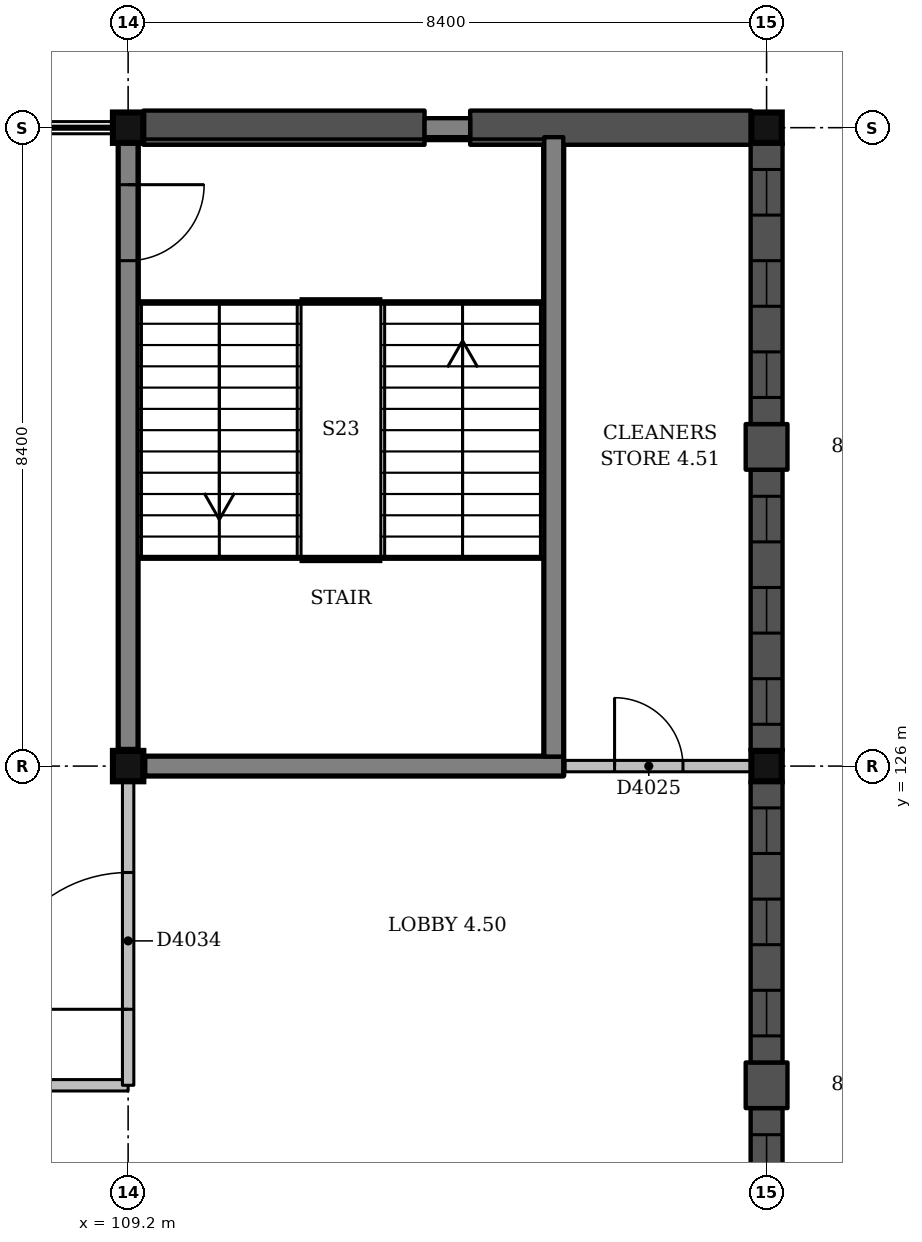
"""IFC4 building model, lengths in metres.
Left out: names, types, materials, properties, quantities, classifications, styles, units other than length and angle.
Written with IfcOpenShell. Run it as: python <this file> out.ifc"""

import sys

from ifc_helpers import new_model, si_unit, direction, frame, frame_2d, origin, origin_2d, place, context, subcontext, project, spatial, rectangle, extrude, element, fill, save


model = new_model("IFC4")
c1 = context("Model", 3, precision=1e-05, world=origin(), true_north=direction((0.0, 1.0)))
c2 = subcontext(c1, "Body", "Model", "MODEL_VIEW")
j1 = project(units=[si_unit("LENGTHUNIT", "METRE"), si_unit("PLANEANGLEUNIT", "RADIAN")], contexts=[c1])
p1 = place(None, origin())
s1 = spatial("IfcSite", under=j1, at=p1, CompositionType="ELEMENT")
p2 = place(p1, origin())
s2 = spatial("IfcBuilding", under=s1, at=p2, CompositionType="ELEMENT")
p3 = place(p2, frame((0.0, 0.0, 18.0)))
s3 = spatial("IfcBuildingStorey", under=s2, at=p3, CompositionType="ELEMENT", Elevation=18.0)
for number, where, z_axis, x_axis in (
    (1, (109.2, 126.0, 0.0), (0.0, 0.0, 1.0), (1.0, 0.0, 0.0)),
    (2, (109.2, 134.4, 0.0), (0.0, 0.0, 1.0), (1.0, 0.0, 0.0)),
    (3, (117.6, 126.0, 0.0), (0.0, 0.0, 1.0), (1.0, 0.0, 0.0)),
    (4, (117.6, 134.4, 0.0), (0.0, 0.0, 1.0), (1.0, 0.0, 0.0)),
):
    element("IfcColumn", number, at=place(p3, frame(where, z_axis=z_axis, x_axis=x_axis)), inside=s3, PredefinedType="COLUMN", context=c2, shape_type="SweptSolid", body=[
        extrude(rectangle(XDim=0.4, YDim=0.4, at=origin_2d()), origin(), (0.0, 0.0, 1.0), 4.5),
    ])
p4 = place(p3, frame((109.425, 126.0, 0.0), z_axis=(0.0, 0.0, 1.0), x_axis=(1.0, 0.0, 0.0)))
e5 = element("IfcWall", 5, at=p4, inside=s3, PredefinedType="SHEAR", context=c2, shape_type="SweptSolid", body=[
    extrude(rectangle(XDim=5.5, YDim=0.25, at=frame_2d((2.75, 0.0))), origin(), (0.0, 0.0, 1.0), 4.5),
])
p5 = place(p3, frame((109.2, 126.225, 0.0), z_axis=(0.0, 0.0, 1.0), x_axis=(0.0, 1.0, 0.0)))
e6 = element("IfcWall", 6, at=p5, inside=s3, PredefinedType="SHEAR", context=c2, shape_type="SweptSolid", body=[
    extrude(rectangle(XDim=7.975, YDim=0.25, at=frame_2d((3.987, 0.0))), origin(), (0.0, 0.0, 1.0), 4.5),
])
p6 = place(p5, frame((6.425, 0.0, 0.0)))
e7 = element("IfcOpeningElement", 7, at=p6, cuts=e6, PredefinedType="OPENING", context=c2, shape_type="SweptSolid", body=[
    extrude(rectangle(XDim=1.0, YDim=2.1, at=frame_2d((0.5, 1.05))), frame((0.0, 0.135, 0.0), z_axis=(0.0, -1.0, 0.0), x_axis=(1.0, 0.0, 0.0)), (0.0, 0.0, 1.0), 0.27),
])
p7 = place(p3, frame((114.8, 126.125, 0.0), z_axis=(0.0, 0.0, 1.0), x_axis=(0.0, 1.0, 0.0)))
e8 = element("IfcWall", 8, at=p7, inside=s3, PredefinedType="SHEAR", context=c2, shape_type="SweptSolid", body=[
    extrude(rectangle(XDim=8.15, YDim=0.25, at=frame_2d((4.075, 0.0))), origin(), (0.0, 0.0, 1.0), 4.5),
])
p8 = place(p3, frame((117.6, 117.8, 0.0), z_axis=(0.0, 0.0, 1.0), x_axis=(0.0, 1.0, 0.0)))
e9 = element("IfcWall", 9, at=p8, inside=s3, PredefinedType="SOLIDWALL", context=c2, shape_type="SweptSolid", body=[
    extrude(rectangle(XDim=3.7, YDim=0.42, at=frame_2d((1.85, 0.0))), origin(), (0.0, 0.0, 1.0), 3.45),
])
p9 = place(p8, frame((0.35, 0.0, 1.0)))
e10 = element("IfcOpeningElement", 10, at=p9, cuts=e9, PredefinedType="OPENING", context=c2, shape_type="SweptSolid", body=[
    extrude(rectangle(XDim=0.6, YDim=2.1, at=frame_2d((0.3, 1.05))), frame((0.0, 0.22, 0.0), z_axis=(0.0, -1.0, 0.0), x_axis=(1.0, 0.0, 0.0)), (0.0, 0.0, 1.0), 0.44),
])
p10 = place(p8, frame((1.55, 0.0, 1.0)))
e11 = element("IfcOpeningElement", 11, at=p10, cuts=e9, PredefinedType="OPENING", context=c2, shape_type="SweptSolid", body=[
    extrude(rectangle(XDim=0.6, YDim=2.1, at=frame_2d((0.3, 1.05))), frame((0.0, 0.22, 0.0), z_axis=(0.0, -1.0, 0.0), x_axis=(1.0, 0.0, 0.0)), (0.0, 0.0, 1.0), 0.44),
])
p11 = place(p8, frame((2.75, 0.0, 1.0)))
e12 = element("IfcOpeningElement", 12, at=p11, cuts=e9, PredefinedType="OPENING", context=c2, shape_type="SweptSolid", body=[
    extrude(rectangle(XDim=0.6, YDim=2.1, at=frame_2d((0.3, 1.05))), frame((0.0, 0.22, 0.0), z_axis=(0.0, -1.0, 0.0), x_axis=(1.0, 0.0, 0.0)), (0.0, 0.0, 1.0), 0.44),
])
p12 = place(p3, frame((117.6, 121.5, 0.0), z_axis=(0.0, 0.0, 1.0), x_axis=(0.0, 1.0, 0.0)))
e13 = element("IfcWall", 13, at=p12, inside=s3, PredefinedType="SOLIDWALL", context=c2, shape_type="SweptSolid", body=[
    extrude(rectangle(XDim=0.6, YDim=0.55, at=frame_2d((0.3, 0.0))), origin(), (0.0, 0.0, 1.0), 3.45),
])
p13 = place(p3, frame((117.6, 122.1, 0.0), z_axis=(0.0, 0.0, 1.0), x_axis=(0.0, 1.0, 0.0)))
e14 = element("IfcWall", 14, at=p13, inside=s3, PredefinedType="SOLIDWALL", context=c2, shape_type="SweptSolid", body=[
    extrude(rectangle(XDim=3.7, YDim=0.42, at=frame_2d((1.85, 0.0))), origin(), (0.0, 0.0, 1.0), 3.45),
])
p14 = place(p13, frame((0.35, 0.0, 1.0)))
e15 = element("IfcOpeningElement", 15, at=p14, cuts=e14, PredefinedType="OPENING", context=c2, shape_type="SweptSolid", body=[
    extrude(rectangle(XDim=0.6, YDim=2.1, at=frame_2d((0.3, 1.05))), frame((0.0, 0.22, 0.0), z_axis=(0.0, -1.0, 0.0), x_axis=(1.0, 0.0, 0.0)), (0.0, 0.0, 1.0), 0.44),
])
p15 = place(p13, frame((1.55, 0.0, 1.0)))
e16 = element("IfcOpeningElement", 16, at=p15, cuts=e14, PredefinedType="OPENING", context=c2, shape_type="SweptSolid", body=[
    extrude(rectangle(XDim=0.6, YDim=2.1, at=frame_2d((0.3, 1.05))), frame((0.0, 0.22, 0.0), z_axis=(0.0, -1.0, 0.0), x_axis=(1.0, 0.0, 0.0)), (0.0, 0.0, 1.0), 0.44),
])
p16 = place(p13, frame((2.75, 0.0, 1.0)))
e17 = element("IfcOpeningElement", 17, at=p16, cuts=e14, PredefinedType="OPENING", context=c2, shape_type="SweptSolid", body=[
    extrude(rectangle(XDim=0.6, YDim=2.1, at=frame_2d((0.3, 1.05))), frame((0.0, 0.22, 0.0), z_axis=(0.0, -1.0, 0.0), x_axis=(1.0, 0.0, 0.0)), (0.0, 0.0, 1.0), 0.44),
])
p17 = place(p3, frame((117.6, 126.2, 0.0), z_axis=(0.0, 0.0, 1.0), x_axis=(0.0, 1.0, 0.0)))
e18 = element("IfcWall", 18, at=p17, inside=s3, PredefinedType="SOLIDWALL", context=c2, shape_type="SweptSolid", body=[
    extrude(rectangle(XDim=3.7, YDim=0.42, at=frame_2d((1.85, 0.0))), origin(), (0.0, 0.0, 1.0), 3.45),
])
p18 = place(p17, frame((0.35, 0.0, 1.0)))
e19 = element("IfcOpeningElement", 19, at=p18, cuts=e18, PredefinedType="OPENING", context=c2, shape_type="SweptSolid", body=[
    extrude(rectangle(XDim=0.6, YDim=2.1, at=frame_2d((0.3, 1.05))), frame((0.0, 0.22, 0.0), z_axis=(0.0, -1.0, 0.0), x_axis=(1.0, 0.0, 0.0)), (0.0, 0.0, 1.0), 0.44),
])
p19 = place(p17, frame((1.55, 0.0, 1.0)))
e20 = element("IfcOpeningElement", 20, at=p19, cuts=e18, PredefinedType="OPENING", context=c2, shape_type="SweptSolid", body=[
    extrude(rectangle(XDim=0.6, YDim=2.1, at=frame_2d((0.3, 1.05))), frame((0.0, 0.22, 0.0), z_axis=(0.0, -1.0, 0.0), x_axis=(1.0, 0.0, 0.0)), (0.0, 0.0, 1.0), 0.44),
])
p20 = place(p17, frame((2.75, 0.0, 1.0)))
e21 = element("IfcOpeningElement", 21, at=p20, cuts=e18, PredefinedType="OPENING", context=c2, shape_type="SweptSolid", body=[
    extrude(rectangle(XDim=0.6, YDim=2.1, at=frame_2d((0.3, 1.05))), frame((0.0, 0.22, 0.0), z_axis=(0.0, -1.0, 0.0), x_axis=(1.0, 0.0, 0.0)), (0.0, 0.0, 1.0), 0.44),
])
p21 = place(p3, frame((117.6, 129.9, 0.0), z_axis=(0.0, 0.0, 1.0), x_axis=(0.0, 1.0, 0.0)))
e22 = element("IfcWall", 22, at=p21, inside=s3, PredefinedType="SOLIDWALL", context=c2, shape_type="SweptSolid", body=[
    extrude(rectangle(XDim=0.6, YDim=0.55, at=frame_2d((0.3, 0.0))), origin(), (0.0, 0.0, 1.0), 3.45),
])
p22 = place(p3, frame((117.6, 130.5, 0.0), z_axis=(0.0, 0.0, 1.0), x_axis=(0.0, 1.0, 0.0)))
e23 = element("IfcWall", 23, at=p22, inside=s3, PredefinedType="SOLIDWALL", context=c2, shape_type="SweptSolid", body=[
    extrude(rectangle(XDim=3.7, YDim=0.42, at=frame_2d((1.85, 0.0))), origin(), (0.0, 0.0, 1.0), 3.45),
])
p23 = place(p22, frame((0.35, 0.0, 1.0)))
e24 = element("IfcOpeningElement", 24, at=p23, cuts=e23, PredefinedType="OPENING", context=c2, shape_type="SweptSolid", body=[
    extrude(rectangle(XDim=0.6, YDim=2.1, at=frame_2d((0.3, 1.05))), frame((0.0, 0.22, 0.0), z_axis=(0.0, -1.0, 0.0), x_axis=(1.0, 0.0, 0.0)), (0.0, 0.0, 1.0), 0.44),
])
p24 = place(p22, frame((1.55, 0.0, 1.0)))
e25 = element("IfcOpeningElement", 25, at=p24, cuts=e23, PredefinedType="OPENING", context=c2, shape_type="SweptSolid", body=[
    extrude(rectangle(XDim=0.6, YDim=2.1, at=frame_2d((0.3, 1.05))), frame((0.0, 0.22, 0.0), z_axis=(0.0, -1.0, 0.0), x_axis=(1.0, 0.0, 0.0)), (0.0, 0.0, 1.0), 0.44),
])
p25 = place(p22, frame((2.75, 0.0, 1.0)))
e26 = element("IfcOpeningElement", 26, at=p25, cuts=e23, PredefinedType="OPENING", context=c2, shape_type="SweptSolid", body=[
    extrude(rectangle(XDim=0.6, YDim=2.1, at=frame_2d((0.3, 1.05))), frame((0.0, 0.22, 0.0), z_axis=(0.0, -1.0, 0.0), x_axis=(1.0, 0.0, 0.0)), (0.0, 0.0, 1.0), 0.44),
])
p26 = place(p3, frame((117.4, 134.4, 0.0), z_axis=(0.0, 0.0, 1.0), x_axis=(-1.0, 0.0, 0.0)))
e27 = element("IfcWall", 27, at=p26, inside=s3, PredefinedType="SOLIDWALL", context=c2, shape_type="SweptSolid", body=[
    extrude(rectangle(XDim=3.7, YDim=0.45, at=frame_2d((1.85, 0.0))), origin(), (0.0, 0.0, 1.0), 3.45),
])
p27 = place(p3, frame((113.1, 134.4, 0.0), z_axis=(0.0, 0.0, 1.0), x_axis=(-1.0, 0.0, 0.0)))
e28 = element("IfcWall", 28, at=p27, inside=s3, PredefinedType="SOLIDWALL", context=c2, shape_type="SweptSolid", body=[
    extrude(rectangle(XDim=3.7, YDim=0.45, at=frame_2d((1.85, 0.0))), origin(), (0.0, 0.0, 1.0), 3.45),
])
p28 = place(p3, frame((92.4, 121.8, 0.0), z_axis=(0.0, 0.0, 1.0), x_axis=(1.0, 0.0, 0.0)))
e29 = element("IfcWall", 29, at=p28, inside=s3, PredefinedType="PARTITIONING", context=c2, shape_type="SweptSolid", body=[
    extrude(rectangle(XDim=16.8, YDim=0.15, at=frame_2d((8.4, 0.0))), origin(), (0.0, 0.0, 1.0), 3.45),
])
p29 = place(p28, frame((0.3, 0.0, 0.0)))
e30 = element("IfcOpeningElement", 30, at=p29, cuts=e29, PredefinedType="OPENING", context=c2, shape_type="SweptSolid", body=[
    extrude(rectangle(XDim=1.8, YDim=2.1, at=frame_2d((0.9, 1.05))), frame((0.0, 0.085, 0.0), z_axis=(0.0, -1.0, 0.0), x_axis=(1.0, 0.0, 0.0)), (0.0, 0.0, 1.0), 0.17),
])
p30 = place(p3, frame((114.95, 126.0, 0.0), z_axis=(0.0, 0.0, 1.0), x_axis=(1.0, 0.0, 0.0)))
e31 = element("IfcWall", 31, at=p30, inside=s3, PredefinedType="PARTITIONING", context=c2, shape_type="SweptSolid", body=[
    extrude(rectangle(XDim=2.45, YDim=0.15, at=frame_2d((1.225, 0.0))), origin(), (0.0, 0.0, 1.0), 3.6),
])
p31 = place(p30, frame((0.65, 0.0, 0.0)))
e32 = element("IfcOpeningElement", 32, at=p31, cuts=e31, PredefinedType="OPENING", context=c2, shape_type="SweptSolid", body=[
    extrude(rectangle(XDim=0.9, YDim=2.1, at=frame_2d((0.45, 1.05))), frame((0.0, 0.085, 0.0), z_axis=(0.0, -1.0, 0.0), x_axis=(1.0, 0.0, 0.0)), (0.0, 0.0, 1.0), 0.17),
])
p32 = place(p3, frame((109.2, 121.8, 0.0), z_axis=(0.0, 0.0, 1.0), x_axis=(0.0, 1.0, 0.0)))
e33 = element("IfcWall", 33, at=p32, inside=s3, PredefinedType="PARTITIONING", context=c2, shape_type="SweptSolid", body=[
    extrude(rectangle(XDim=4.0, YDim=0.15, at=frame_2d((2.0, 0.0))), origin(), (0.0, 0.0, 1.0), 3.5),
])
p33 = place(p32, frame((1.0, 0.0, 0.0)))
e34 = element("IfcOpeningElement", 34, at=p33, cuts=e33, PredefinedType="OPENING", context=c2, shape_type="SweptSolid", body=[
    extrude(rectangle(XDim=1.8, YDim=2.1, at=frame_2d((0.9, 1.05))), frame((0.0, 0.085, 0.0), z_axis=(0.0, -1.0, 0.0), x_axis=(1.0, 0.0, 0.0)), (0.0, 0.0, 1.0), 0.17),
])
p34 = place(p3, frame((113.1, 134.4, 0.0), z_axis=(0.0, 0.0, 1.0), x_axis=(1.0, 0.0, 0.0)))
e35 = element("IfcWall", 35, at=p34, inside=s3, PredefinedType="SHEAR", context=c2, shape_type="SweptSolid", body=[
    extrude(rectangle(XDim=0.6, YDim=0.25, at=frame_2d((0.3, 0.0))), origin(), (0.0, 0.0, 1.0), 4.5),
])
p35 = place(p11, origin())
e36 = element("IfcWindow", 36, at=p35, inside=s3, PartitioningType="SINGLE_PANEL", PredefinedType="WINDOW", context=c2, shape_type="SweptSolid", body=[
    extrude(rectangle(XDim=0.6, YDim=2.1, at=frame_2d((0.3, 1.05))), frame((0.0, 0.15, 0.0), z_axis=(0.0, -1.0, 0.0), x_axis=(1.0, 0.0, 0.0)), (0.0, 0.0, 1.0), 0.06),
])
fill(e12, e36)
p36 = place(p14, origin())
e37 = element("IfcWindow", 37, at=p36, inside=s3, PartitioningType="SINGLE_PANEL", PredefinedType="WINDOW", context=c2, shape_type="SweptSolid", body=[
    extrude(rectangle(XDim=0.6, YDim=2.1, at=frame_2d((0.3, 1.05))), frame((0.0, 0.15, 0.0), z_axis=(0.0, -1.0, 0.0), x_axis=(1.0, 0.0, 0.0)), (0.0, 0.0, 1.0), 0.06),
])
fill(e15, e37)
p37 = place(p15, origin())
e38 = element("IfcWindow", 38, at=p37, inside=s3, PartitioningType="SINGLE_PANEL", PredefinedType="WINDOW", context=c2, shape_type="SweptSolid", body=[
    extrude(rectangle(XDim=0.6, YDim=2.1, at=frame_2d((0.3, 1.05))), frame((0.0, 0.15, 0.0), z_axis=(0.0, -1.0, 0.0), x_axis=(1.0, 0.0, 0.0)), (0.0, 0.0, 1.0), 0.06),
])
fill(e16, e38)
p38 = place(p16, origin())
e39 = element("IfcWindow", 39, at=p38, inside=s3, PartitioningType="SINGLE_PANEL", PredefinedType="WINDOW", context=c2, shape_type="SweptSolid", body=[
    extrude(rectangle(XDim=0.6, YDim=2.1, at=frame_2d((0.3, 1.05))), frame((0.0, 0.15, 0.0), z_axis=(0.0, -1.0, 0.0), x_axis=(1.0, 0.0, 0.0)), (0.0, 0.0, 1.0), 0.06),
])
fill(e17, e39)
p39 = place(p18, origin())
e40 = element("IfcWindow", 40, at=p39, inside=s3, PartitioningType="SINGLE_PANEL", PredefinedType="WINDOW", context=c2, shape_type="SweptSolid", body=[
    extrude(rectangle(XDim=0.6, YDim=2.1, at=frame_2d((0.3, 1.05))), frame((0.0, 0.15, 0.0), z_axis=(0.0, -1.0, 0.0), x_axis=(1.0, 0.0, 0.0)), (0.0, 0.0, 1.0), 0.06),
])
fill(e19, e40)
p40 = place(p19, origin())
e41 = element("IfcWindow", 41, at=p40, inside=s3, PartitioningType="SINGLE_PANEL", PredefinedType="WINDOW", context=c2, shape_type="SweptSolid", body=[
    extrude(rectangle(XDim=0.6, YDim=2.1, at=frame_2d((0.3, 1.05))), frame((0.0, 0.15, 0.0), z_axis=(0.0, -1.0, 0.0), x_axis=(1.0, 0.0, 0.0)), (0.0, 0.0, 1.0), 0.06),
])
fill(e20, e41)
p41 = place(p20, origin())
e42 = element("IfcWindow", 42, at=p41, inside=s3, PartitioningType="SINGLE_PANEL", PredefinedType="WINDOW", context=c2, shape_type="SweptSolid", body=[
    extrude(rectangle(XDim=0.6, YDim=2.1, at=frame_2d((0.3, 1.05))), frame((0.0, 0.15, 0.0), z_axis=(0.0, -1.0, 0.0), x_axis=(1.0, 0.0, 0.0)), (0.0, 0.0, 1.0), 0.06),
])
fill(e21, e42)
p42 = place(p23, origin())
e43 = element("IfcWindow", 43, at=p42, inside=s3, PartitioningType="SINGLE_PANEL", PredefinedType="WINDOW", context=c2, shape_type="SweptSolid", body=[
    extrude(rectangle(XDim=0.6, YDim=2.1, at=frame_2d((0.3, 1.05))), frame((0.0, 0.15, 0.0), z_axis=(0.0, -1.0, 0.0), x_axis=(1.0, 0.0, 0.0)), (0.0, 0.0, 1.0), 0.06),
])
fill(e24, e43)
p43 = place(p24, origin())
e44 = element("IfcWindow", 44, at=p43, inside=s3, PartitioningType="SINGLE_PANEL", PredefinedType="WINDOW", context=c2, shape_type="SweptSolid", body=[
    extrude(rectangle(XDim=0.6, YDim=2.1, at=frame_2d((0.3, 1.05))), frame((0.0, 0.15, 0.0), z_axis=(0.0, -1.0, 0.0), x_axis=(1.0, 0.0, 0.0)), (0.0, 0.0, 1.0), 0.06),
])
fill(e25, e44)
p44 = place(p25, origin())
e45 = element("IfcWindow", 45, at=p44, inside=s3, PartitioningType="SINGLE_PANEL", PredefinedType="WINDOW", context=c2, shape_type="SweptSolid", body=[
    extrude(rectangle(XDim=0.6, YDim=2.1, at=frame_2d((0.3, 1.05))), frame((0.0, 0.15, 0.0), z_axis=(0.0, -1.0, 0.0), x_axis=(1.0, 0.0, 0.0)), (0.0, 0.0, 1.0), 0.06),
])
fill(e26, e45)
p45 = place(p31, origin())
e46 = element("IfcDoor", 46, at=p45, inside=s3, OperationType="SINGLE_SWING_LEFT", PredefinedType="DOOR", context=c2, shape_type="SweptSolid", body=[
    extrude(rectangle(XDim=0.9, YDim=2.1, at=frame_2d((0.45, 1.05))), frame((0.0, 0.025, 0.0), z_axis=(0.0, -1.0, 0.0), x_axis=(1.0, 0.0, 0.0)), (0.0, 0.0, 1.0), 0.05),
])
fill(e32, e46)
p46 = place(p33, origin())
e47 = element("IfcDoor", 47, at=p46, inside=s3, OperationType="DOUBLE_DOOR_SINGLE_SWING", PredefinedType="DOOR", context=c2, shape_type="SweptSolid", body=[
    extrude(rectangle(XDim=1.8, YDim=2.1, at=frame_2d((0.9, 1.05))), frame((0.0, 0.025, 0.0), z_axis=(0.0, -1.0, 0.0), x_axis=(1.0, 0.0, 0.0)), (0.0, 0.0, 1.0), 0.05),
])
fill(e34, e47)
p47 = place(p6, origin())
e48 = element("IfcDoor", 48, at=p47, inside=s3, OperationType="SINGLE_SWING_RIGHT", PredefinedType="DOOR", context=c2, shape_type="SweptSolid", body=[
    extrude(rectangle(XDim=1.0, YDim=2.1, at=frame_2d((0.5, 1.05))), frame((0.0, 0.025, 0.0), z_axis=(0.0, -1.0, 0.0), x_axis=(1.0, 0.0, 0.0)), (0.0, 0.0, 1.0), 0.05),
])
fill(e7, e48)
save(model, sys.argv[1])
